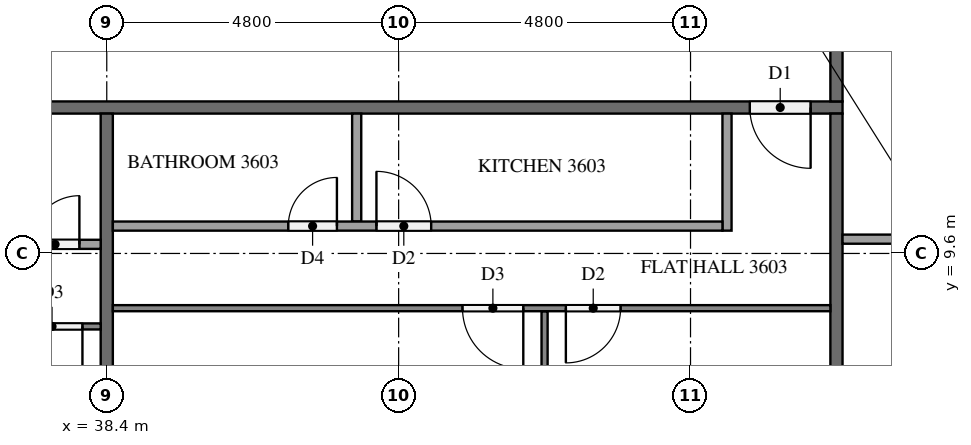
"""IFC4 building model, lengths in metres.
Left out: names, types, materials, properties, quantities, classifications, styles, units other than length and angle.
Written with IfcOpenShell. Run it as: python <this file> out.ifc"""

import sys

from ifc_helpers import new_model, si_unit, direction, frame, frame_2d, origin, place, context, subcontext, project, spatial, rectangle, extrude, element, fill, save


model = new_model("IFC4")
c1 = context("Model", 3, precision=1e-05, world=origin(), true_north=direction((0.0, 1.0)))
c2 = subcontext(c1, "Body", "Model", "MODEL_VIEW")
j1 = project(units=[si_unit("LENGTHUNIT", "METRE"), si_unit("PLANEANGLEUNIT", "RADIAN")], contexts=[c1])
p1 = place(None, origin())
s1 = spatial("IfcSite", under=j1, at=p1, CompositionType="ELEMENT")
p2 = place(p1, origin())
s2 = spatial("IfcBuilding", under=s1, at=p2, CompositionType="ELEMENT")
p3 = place(p2, frame((0.0, 0.0, 140.1)))
s3 = spatial("IfcBuildingStorey", under=s2, at=p3, CompositionType="ELEMENT", Elevation=140.1)
p4 = place(p3, frame((50.5, 12.0, 0.0), z_axis=(0.0, 0.0, 1.0), x_axis=(-1.0, 0.0, 0.0)))
e1 = element("IfcWall", 1, at=p4, inside=s3, PredefinedType="PARTITIONING", context=c2, shape_type="SweptSolid", body=[
    extrude(rectangle(XDim=38.6, YDim=0.2, at=frame_2d((19.3, 0.0))), origin(), (0.0, 0.0, 1.0), 3.1),
])
p5 = place(p4, frame((37.075, 0.0, 0.0)))
e2 = element("IfcOpeningElement", 2, at=p5, cuts=e1, PredefinedType="OPENING", context=c2, shape_type="SweptSolid", body=[
    extrude(rectangle(XDim=1.0, YDim=2.1, at=frame_2d((0.5, 1.05))), frame((0.0, 0.11, 0.0), z_axis=(0.0, -1.0, 0.0), x_axis=(1.0, 0.0, 0.0)), (0.0, 0.0, 1.0), 0.22),
])
p6 = place(p4, frame((27.475, 0.0, 0.0)))
e3 = element("IfcOpeningElement", 3, at=p6, cuts=e1, PredefinedType="OPENING", context=c2, shape_type="SweptSolid", body=[
    extrude(rectangle(XDim=1.0, YDim=2.1, at=frame_2d((0.5, 1.05))), frame((0.0, 0.11, 0.0), z_axis=(0.0, -1.0, 0.0), x_axis=(1.0, 0.0, 0.0)), (0.0, 0.0, 1.0), 0.22),
])
p7 = place(p4, frame((0.525, 0.0, 0.0)))
e4 = element("IfcOpeningElement", 4, at=p7, cuts=e1, PredefinedType="OPENING", context=c2, shape_type="SweptSolid", body=[
    extrude(rectangle(XDim=1.0, YDim=2.1, at=frame_2d((0.5, 1.05))), frame((0.0, 0.11, 0.0), z_axis=(0.0, -1.0, 0.0), x_axis=(1.0, 0.0, 0.0)), (0.0, 0.0, 1.0), 0.22),
])
p8 = place(p3, frame((50.4, 14.9, 0.0), z_axis=(0.0, 0.0, 1.0), x_axis=(0.0, -1.0, 0.0)))
e5 = element("IfcWall", 5, at=p8, inside=s3, PredefinedType="PARTITIONING", context=c2, shape_type="SweptSolid", body=[
    extrude(rectangle(XDim=2.8, YDim=0.2, at=frame_2d((1.4, 0.0))), origin(), (0.0, 0.0, 1.0), 3.1),
])
p9 = place(p8, frame((0.325, 0.0, 0.0)))
e6 = element("IfcOpeningElement", 6, at=p9, cuts=e5, PredefinedType="OPENING", context=c2, shape_type="SweptSolid", body=[
    extrude(rectangle(XDim=1.0, YDim=2.1, at=frame_2d((0.5, 1.05))), frame((0.0, 0.11, 0.0), z_axis=(0.0, -1.0, 0.0), x_axis=(1.0, 0.0, 0.0)), (0.0, 0.0, 1.0), 0.22),
])
for number, where, z_axis, x_axis in (
    (7, (38.4, 11.9, 0.0), (0.0, 0.0, 1.0), (0.0, -1.0, 0.0)),
    (8, (50.4, 11.9, 0.0), (0.0, 0.0, 1.0), (0.0, -1.0, 0.0)),
):
    element("IfcWall", number, at=place(p3, frame(where, z_axis=z_axis, x_axis=x_axis)), inside=s3, PredefinedType="PARTITIONING", context=c2, shape_type="SweptSolid", body=[
        extrude(rectangle(XDim=7.0, YDim=0.2, at=frame_2d((3.5, 0.0))), origin(), (0.0, 0.0, 1.0), 3.1),
    ])
p10 = place(p3, frame((38.3, 8.4, 0.0), z_axis=(0.0, 0.0, 1.0), x_axis=(-1.0, 0.0, 0.0)))
e9 = element("IfcWall", 9, at=p10, inside=s3, PredefinedType="PARTITIONING", context=c2, shape_type="SweptSolid", body=[
    extrude(rectangle(XDim=16.6, YDim=0.1, at=frame_2d((8.3, 0.0))), origin(), (0.0, 0.0, 1.0), 3.1),
])
p11 = place(p10, frame((12.25, 0.0, 0.0)))
e10 = element("IfcOpeningElement", 10, at=p11, cuts=e9, PredefinedType="OPENING", context=c2, shape_type="SweptSolid", body=[
    extrude(rectangle(XDim=0.9, YDim=2.1, at=frame_2d((0.45, 1.05))), frame((0.0, 0.06, 0.0), z_axis=(0.0, -1.0, 0.0), x_axis=(1.0, 0.0, 0.0)), (0.0, 0.0, 1.0), 0.12),
])
p12 = place(p10, frame((10.65, 0.0, 0.0)))
e11 = element("IfcOpeningElement", 11, at=p12, cuts=e9, PredefinedType="OPENING", context=c2, shape_type="SweptSolid", body=[
    extrude(rectangle(XDim=0.9, YDim=2.1, at=frame_2d((0.45, 1.05))), frame((0.0, 0.06, 0.0), z_axis=(0.0, -1.0, 0.0), x_axis=(1.0, 0.0, 0.0)), (0.0, 0.0, 1.0), 0.12),
])
p13 = place(p10, frame((0.3, 0.0, 0.0)))
e12 = element("IfcOpeningElement", 12, at=p13, cuts=e9, PredefinedType="OPENING", context=c2, shape_type="SweptSolid", body=[
    extrude(rectangle(XDim=1.0, YDim=2.1, at=frame_2d((0.5, 1.05))), frame((0.0, 0.06, 0.0), z_axis=(0.0, -1.0, 0.0), x_axis=(1.0, 0.0, 0.0)), (0.0, 0.0, 1.0), 0.12),
])
p14 = place(p3, frame((23.475, 9.75, 0.0), z_axis=(0.0, 0.0, 1.0), x_axis=(1.0, 0.0, 0.0)))
e13 = element("IfcWall", 13, at=p14, inside=s3, PredefinedType="PARTITIONING", context=c2, shape_type="SweptSolid", body=[
    extrude(rectangle(XDim=14.825, YDim=0.15, at=frame_2d((7.413, 0.0))), origin(), (0.0, 0.0, 1.0), 3.1),
])
p15 = place(p14, frame((3.336, 0.0, 0.0)))
e14 = element("IfcOpeningElement", 14, at=p15, cuts=e13, PredefinedType="OPENING", context=c2, shape_type="SweptSolid", body=[
    extrude(rectangle(XDim=0.9, YDim=2.1, at=frame_2d((0.45, 1.05))), frame((0.0, 0.085, 0.0), z_axis=(0.0, -1.0, 0.0), x_axis=(1.0, 0.0, 0.0)), (0.0, 0.0, 1.0), 0.17),
])
p16 = place(p14, frame((4.886, 0.0, 0.0)))
e15 = element("IfcOpeningElement", 15, at=p16, cuts=e13, PredefinedType="OPENING", context=c2, shape_type="SweptSolid", body=[
    extrude(rectangle(XDim=0.9, YDim=2.1, at=frame_2d((0.45, 1.05))), frame((0.0, 0.085, 0.0), z_axis=(0.0, -1.0, 0.0), x_axis=(1.0, 0.0, 0.0)), (0.0, 0.0, 1.0), 0.17),
])
p17 = place(p14, frame((13.675, 0.0, 0.0)))
e16 = element("IfcOpeningElement", 16, at=p17, cuts=e13, PredefinedType="OPENING", context=c2, shape_type="SweptSolid", body=[
    extrude(rectangle(XDim=0.8, YDim=2.1, at=frame_2d((0.4, 1.05))), frame((0.0, 0.085, 0.0), z_axis=(0.0, -1.0, 0.0), x_axis=(1.0, 0.0, 0.0)), (0.0, 0.0, 1.0), 0.17),
])
p18 = place(p3, frame((45.6, 8.65, 0.0), z_axis=(0.0, 0.0, 1.0), x_axis=(0.0, -1.0, 0.0)))
e17 = element("IfcWall", 17, at=p18, inside=s3, PredefinedType="PARTITIONING", context=c2, shape_type="SweptSolid", body=[
    extrude(rectangle(XDim=3.75, YDim=0.1, at=frame_2d((1.875, 0.0))), origin(), (0.0, 0.0, 1.0), 3.1),
])
p19 = place(p3, frame((50.3, 8.7, 0.0), z_axis=(0.0, 0.0, 1.0), x_axis=(-1.0, 0.0, 0.0)))
e18 = element("IfcWall", 18, at=p19, inside=s3, PredefinedType="PARTITIONING", context=c2, shape_type="SweptSolid", body=[
    extrude(rectangle(XDim=11.8, YDim=0.1, at=frame_2d((5.9, 0.0))), origin(), (0.0, 0.0, 1.0), 3.1),
])
p20 = place(p19, frame((3.45, 0.0, 0.0)))
e19 = element("IfcOpeningElement", 19, at=p20, cuts=e18, PredefinedType="OPENING", context=c2, shape_type="SweptSolid", body=[
    extrude(rectangle(XDim=0.9, YDim=2.1, at=frame_2d((0.45, 1.05))), frame((0.0, 0.06, 0.0), z_axis=(0.0, -1.0, 0.0), x_axis=(1.0, 0.0, 0.0)), (0.0, 0.0, 1.0), 0.12),
])
p21 = place(p19, frame((5.05, 0.0, 0.0)))
e20 = element("IfcOpeningElement", 20, at=p21, cuts=e18, PredefinedType="OPENING", context=c2, shape_type="SweptSolid", body=[
    extrude(rectangle(XDim=1.0, YDim=2.1, at=frame_2d((0.5, 1.05))), frame((0.0, 0.06, 0.0), z_axis=(0.0, -1.0, 0.0), x_axis=(1.0, 0.0, 0.0)), (0.0, 0.0, 1.0), 0.12),
])
p22 = place(p3, frame((42.51, 11.9, 0.0), z_axis=(0.0, 0.0, 1.0), x_axis=(0.0, -1.0, 0.0)))
e21 = element("IfcWall", 21, at=p22, inside=s3, PredefinedType="PARTITIONING", context=c2, shape_type="SweptSolid", body=[
    extrude(rectangle(XDim=1.775, YDim=0.15, at=frame_2d((0.887, 0.0))), origin(), (0.0, 0.0, 1.0), 3.1),
])
p23 = place(p3, frame((48.6, 11.9, 0.0), z_axis=(0.0, 0.0, 1.0), x_axis=(0.0, -1.0, 0.0)))
e22 = element("IfcWall", 22, at=p23, inside=s3, PredefinedType="PARTITIONING", context=c2, shape_type="SweptSolid", body=[
    extrude(rectangle(XDim=1.925, YDim=0.15, at=frame_2d((0.962, 0.0))), origin(), (0.0, 0.0, 1.0), 3.1),
])
p24 = place(p3, frame((38.5, 10.05, 0.0), z_axis=(0.0, 0.0, 1.0), x_axis=(1.0, 0.0, 0.0)))
e23 = element("IfcWall", 23, at=p24, inside=s3, PredefinedType="PARTITIONING", context=c2, shape_type="SweptSolid", body=[
    extrude(rectangle(XDim=10.025, YDim=0.15, at=frame_2d((5.012, 0.0))), origin(), (0.0, 0.0, 1.0), 3.1),
])
p25 = place(p24, frame((4.335, 0.0, 0.0)))
e24 = element("IfcOpeningElement", 24, at=p25, cuts=e23, PredefinedType="OPENING", context=c2, shape_type="SweptSolid", body=[
    extrude(rectangle(XDim=0.9, YDim=2.1, at=frame_2d((0.45, 1.05))), frame((0.0, 0.085, 0.0), z_axis=(0.0, -1.0, 0.0), x_axis=(1.0, 0.0, 0.0)), (0.0, 0.0, 1.0), 0.17),
])
p26 = place(p24, frame((2.885, 0.0, 0.0)))
e25 = element("IfcOpeningElement", 25, at=p26, cuts=e23, PredefinedType="OPENING", context=c2, shape_type="SweptSolid", body=[
    extrude(rectangle(XDim=0.8, YDim=2.1, at=frame_2d((0.4, 1.05))), frame((0.0, 0.085, 0.0), z_axis=(0.0, -1.0, 0.0), x_axis=(1.0, 0.0, 0.0)), (0.0, 0.0, 1.0), 0.17),
])
p27 = place(p3, frame((50.5, 9.835, 0.0), z_axis=(0.0, 0.0, 1.0), x_axis=(1.0, 0.0, 0.0)))
e26 = element("IfcWall", 26, at=p27, inside=s3, PredefinedType="PARTITIONING", context=c2, shape_type="SweptSolid", body=[
    extrude(rectangle(XDim=1.925, YDim=0.15, at=frame_2d((0.962, 0.0))), origin(), (0.0, 0.0, 1.0), 3.1),
])
p28 = place(p7, origin())
e27 = element("IfcDoor", 27, at=p28, inside=s3, OperationType="SINGLE_SWING_LEFT", PredefinedType="DOOR", context=c2, shape_type="SweptSolid", body=[
    extrude(rectangle(XDim=1.0, YDim=2.1, at=frame_2d((0.5, 1.05))), frame((0.0, 0.025, 0.0), z_axis=(0.0, -1.0, 0.0), x_axis=(1.0, 0.0, 0.0)), (0.0, 0.0, 1.0), 0.05),
])
fill(e4, e27)
p29 = place(p13, origin())
e28 = element("IfcDoor", 28, at=p29, inside=s3, OperationType="SINGLE_SWING_LEFT", PredefinedType="DOOR", context=c2, shape_type="SweptSolid", body=[
    extrude(rectangle(XDim=1.0, YDim=2.1, at=frame_2d((0.5, 1.05))), frame((0.0, 0.025, 0.0), z_axis=(0.0, -1.0, 0.0), x_axis=(1.0, 0.0, 0.0)), (0.0, 0.0, 1.0), 0.05),
])
fill(e12, e28)
p30 = place(p17, origin())
e29 = element("IfcDoor", 29, at=p30, inside=s3, OperationType="SINGLE_SWING_RIGHT", PredefinedType="DOOR", context=c2, shape_type="SweptSolid", body=[
    extrude(rectangle(XDim=0.8, YDim=2.1, at=frame_2d((0.4, 1.05))), frame((0.0, 0.025, 0.0), z_axis=(0.0, -1.0, 0.0), x_axis=(1.0, 0.0, 0.0)), (0.0, 0.0, 1.0), 0.05),
])
fill(e16, e29)
p31 = place(p20, origin())
e30 = element("IfcDoor", 30, at=p31, inside=s3, OperationType="SINGLE_SWING_RIGHT", PredefinedType="DOOR", context=c2, shape_type="SweptSolid", body=[
    extrude(rectangle(XDim=0.9, YDim=2.1, at=frame_2d((0.45, 1.05))), frame((0.0, 0.025, 0.0), z_axis=(0.0, -1.0, 0.0), x_axis=(1.0, 0.0, 0.0)), (0.0, 0.0, 1.0), 0.05),
])
fill(e19, e30)
p32 = place(p21, origin())
e31 = element("IfcDoor", 31, at=p32, inside=s3, OperationType="SINGLE_SWING_LEFT", PredefinedType="DOOR", context=c2, shape_type="SweptSolid", body=[
    extrude(rectangle(XDim=1.0, YDim=2.1, at=frame_2d((0.5, 1.05))), frame((0.0, 0.025, 0.0), z_axis=(0.0, -1.0, 0.0), x_axis=(1.0, 0.0, 0.0)), (0.0, 0.0, 1.0), 0.05),
])
fill(e20, e31)
p33 = place(p25, origin())
e32 = element("IfcDoor", 32, at=p33, inside=s3, OperationType="SINGLE_SWING_LEFT", PredefinedType="DOOR", context=c2, shape_type="SweptSolid", body=[
    extrude(rectangle(XDim=0.9, YDim=2.1, at=frame_2d((0.45, 1.05))), frame((0.0, 0.025, 0.0), z_axis=(0.0, -1.0, 0.0), x_axis=(1.0, 0.0, 0.0)), (0.0, 0.0, 1.0), 0.05),
])
fill(e24, e32)
p34 = place(p26, origin())
e33 = element("IfcDoor", 33, at=p34, inside=s3, OperationType="SINGLE_SWING_RIGHT", PredefinedType="DOOR", context=c2, shape_type="SweptSolid", body=[
    extrude(rectangle(XDim=0.8, YDim=2.1, at=frame_2d((0.4, 1.05))), frame((0.0, 0.025, 0.0), z_axis=(0.0, -1.0, 0.0), x_axis=(1.0, 0.0, 0.0)), (0.0, 0.0, 1.0), 0.05),
])
fill(e25, e33)
save(model, sys.argv[1])
